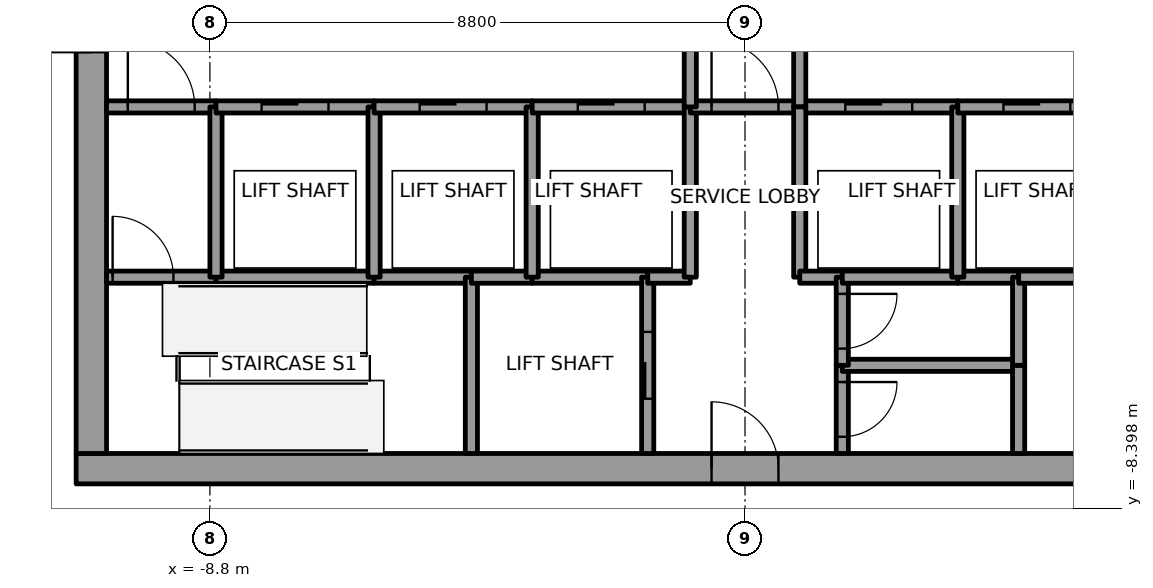
"""IFC4 building model, lengths in metres.
Left out: names, types, materials, properties, quantities, classifications, styles, units other than length and angle.
Written with IfcOpenShell. Run it as: python <this file> out.ifc"""

import sys

from ifc_helpers import new_model, si_unit, direction, frame, frame_2d, origin, place, context, subcontext, project, spatial, rectangle, extrude, element, fill, save


model = new_model("IFC4")
c1 = context("Model", 3, precision=1e-05, world=origin(), true_north=direction((0.0, 1.0)))
c2 = subcontext(c1, "Body", "Model", "MODEL_VIEW")
j1 = project(units=[si_unit("LENGTHUNIT", "METRE"), si_unit("PLANEANGLEUNIT", "RADIAN")], contexts=[c1])
p1 = place(None, origin())
s1 = spatial("IfcSite", under=j1, at=p1, CompositionType="ELEMENT")
p2 = place(p1, origin())
s2 = spatial("IfcBuilding", under=s1, at=p2, CompositionType="ELEMENT")
p3 = place(p2, frame((0.0, 0.0, 287.0)))
s3 = spatial("IfcBuildingStorey", under=s2, at=p3, CompositionType="ELEMENT", Elevation=287.0)
p4 = place(p3, frame((-11.0, -7.75, 0.0), z_axis=(0.0, 0.0, 1.0), x_axis=(1.0, 0.0, 0.0)))
e1 = element("IfcWall", 1, at=p4, inside=s3, PredefinedType="SHEAR", context=c2, shape_type="SweptSolid", body=[
    extrude(rectangle(XDim=22.0, YDim=0.5, at=frame_2d((11.0, 0.0))), origin(), (0.0, 0.0, 1.0), 4.0),
])
p5 = place(p4, frame((10.45, 0.0, 0.0)))
e2 = element("IfcOpeningElement", 2, at=p5, cuts=e1, PredefinedType="OPENING", context=c2, shape_type="SweptSolid", body=[
    extrude(rectangle(XDim=1.1, YDim=2.1, at=frame_2d((0.55, 1.05))), frame((0.0, 0.25, 0.0), z_axis=(0.0, -1.0, 0.0), x_axis=(1.0, 0.0, 0.0)), (0.0, 0.0, 1.0), 0.5),
])
p6 = place(p3, frame((-10.75, -7.5, 0.0), z_axis=(0.0, 0.0, 1.0), x_axis=(0.0, 1.0, 0.0)))
e3 = element("IfcWall", 3, at=p6, inside=s3, PredefinedType="SHEAR", context=c2, shape_type="SweptSolid", body=[
    extrude(rectangle(XDim=15.0, YDim=0.5, at=frame_2d((7.5, 0.0))), origin(), (0.0, 0.0, 1.0), 4.0),
])
p7 = place(p6, frame((6.6, 0.0, 0.0)))
e4 = element("IfcOpeningElement", 4, at=p7, cuts=e3, PredefinedType="OPENING", context=c2, shape_type="SweptSolid", body=[
    extrude(rectangle(XDim=1.8, YDim=2.1, at=frame_2d((0.9, 1.05))), frame((0.0, 0.25, 0.0), z_axis=(0.0, -1.0, 0.0), x_axis=(1.0, 0.0, 0.0)), (0.0, 0.0, 1.0), 0.5),
])
p8 = place(p3, frame((-10.5, -4.6, 0.0), z_axis=(0.0, 0.0, 1.0), x_axis=(1.0, 0.0, 0.0)))
e5 = element("IfcWall", 5, at=p8, inside=s3, PredefinedType="SOLIDWALL", context=c2, shape_type="SweptSolid", body=[
    extrude(rectangle(XDim=1.8, YDim=0.2, at=frame_2d((0.9, 0.0))), origin(), (0.0, 0.0, 1.0), 3.85),
])
p9 = place(p8, frame((0.1, 0.0, 0.0)))
e6 = element("IfcOpeningElement", 6, at=p9, cuts=e5, PredefinedType="OPENING", context=c2, shape_type="SweptSolid", body=[
    extrude(rectangle(XDim=1.0, YDim=2.1, at=frame_2d((0.5, 1.05))), frame((0.0, 0.1, 0.0), z_axis=(0.0, -1.0, 0.0), x_axis=(1.0, 0.0, 0.0)), (0.0, 0.0, 1.0), 0.2),
])
p10 = place(p3, frame((-10.5, -1.8, 0.0), z_axis=(0.0, 0.0, 1.0), x_axis=(1.0, 0.0, 0.0)))
e7 = element("IfcWall", 7, at=p10, inside=s3, PredefinedType="SOLIDWALL", context=c2, shape_type="SweptSolid", body=[
    extrude(rectangle(XDim=1.8, YDim=0.2, at=frame_2d((0.9, 0.0))), origin(), (0.0, 0.0, 1.0), 3.85),
])
p11 = place(p10, frame((0.35, 0.0, 0.0)))
e8 = element("IfcOpeningElement", 8, at=p11, cuts=e7, PredefinedType="OPENING", context=c2, shape_type="SweptSolid", body=[
    extrude(rectangle(XDim=1.1, YDim=2.1, at=frame_2d((0.55, 1.05))), frame((0.0, 0.1, 0.0), z_axis=(0.0, -1.0, 0.0), x_axis=(1.0, 0.0, 0.0)), (0.0, 0.0, 1.0), 0.2),
])
p12 = place(p3, frame((-8.7, -4.6, 0.0), z_axis=(0.0, 0.0, 1.0), x_axis=(1.0, 0.0, 0.0)))
e9 = element("IfcWall", 9, at=p12, inside=s3, PredefinedType="SOLIDWALL", context=c2, shape_type="SweptSolid", body=[
    extrude(rectangle(XDim=2.6, YDim=0.2, at=frame_2d((1.3, 0.0))), origin(), (0.0, 0.0, 1.0), 3.85),
])
p13 = place(p3, frame((-8.7, -4.6, 0.0), z_axis=(0.0, 0.0, 1.0), x_axis=(0.0, 1.0, 0.0)))
e10 = element("IfcWall", 10, at=p13, inside=s3, PredefinedType="SOLIDWALL", context=c2, shape_type="SweptSolid", body=[
    extrude(rectangle(XDim=2.8, YDim=0.2, at=frame_2d((1.4, 0.0))), origin(), (0.0, 0.0, 1.0), 3.85),
])
p14 = place(p3, frame((-8.7, -1.8, 0.0), z_axis=(0.0, 0.0, 1.0), x_axis=(1.0, 0.0, 0.0)))
e11 = element("IfcWall", 11, at=p14, inside=s3, PredefinedType="SOLIDWALL", context=c2, shape_type="SweptSolid", body=[
    extrude(rectangle(XDim=2.6, YDim=0.2, at=frame_2d((1.3, 0.0))), origin(), (0.0, 0.0, 1.0), 3.85),
])
p15 = place(p14, frame((0.75, 0.0, 0.0)))
e12 = element("IfcOpeningElement", 12, at=p15, cuts=e11, PredefinedType="OPENING", context=c2, shape_type="SweptSolid", body=[
    extrude(rectangle(XDim=1.1, YDim=2.1, at=frame_2d((0.55, 1.05))), frame((0.0, 0.1, 0.0), z_axis=(0.0, -1.0, 0.0), x_axis=(1.0, 0.0, 0.0)), (0.0, 0.0, 1.0), 0.2),
])
p16 = place(p3, frame((-6.1, -4.6, 0.0), z_axis=(0.0, 0.0, 1.0), x_axis=(1.0, 0.0, 0.0)))
e13 = element("IfcWall", 13, at=p16, inside=s3, PredefinedType="SOLIDWALL", context=c2, shape_type="SweptSolid", body=[
    extrude(rectangle(XDim=1.6, YDim=0.2, at=frame_2d((0.8, 0.0))), origin(), (0.0, 0.0, 1.0), 3.85),
])
p17 = place(p3, frame((-6.1, -4.6, 0.0), z_axis=(0.0, 0.0, 1.0), x_axis=(0.0, 1.0, 0.0)))
e14 = element("IfcWall", 14, at=p17, inside=s3, PredefinedType="SOLIDWALL", context=c2, shape_type="SweptSolid", body=[
    extrude(rectangle(XDim=2.8, YDim=0.2, at=frame_2d((1.4, 0.0))), origin(), (0.0, 0.0, 1.0), 3.85),
])
p18 = place(p3, frame((-6.1, -1.8, 0.0), z_axis=(0.0, 0.0, 1.0), x_axis=(1.0, 0.0, 0.0)))
e15 = element("IfcWall", 15, at=p18, inside=s3, PredefinedType="SOLIDWALL", context=c2, shape_type="SweptSolid", body=[
    extrude(rectangle(XDim=2.6, YDim=0.2, at=frame_2d((1.3, 0.0))), origin(), (0.0, 0.0, 1.0), 3.85),
])
p19 = place(p18, frame((0.75, 0.0, 0.0)))
e16 = element("IfcOpeningElement", 16, at=p19, cuts=e15, PredefinedType="OPENING", context=c2, shape_type="SweptSolid", body=[
    extrude(rectangle(XDim=1.1, YDim=2.1, at=frame_2d((0.55, 1.05))), frame((0.0, 0.1, 0.0), z_axis=(0.0, -1.0, 0.0), x_axis=(1.0, 0.0, 0.0)), (0.0, 0.0, 1.0), 0.2),
])
p20 = place(p3, frame((-4.5, -4.6, 0.0), z_axis=(0.0, 0.0, 1.0), x_axis=(0.0, -1.0, 0.0)))
e17 = element("IfcWall", 17, at=p20, inside=s3, PredefinedType="SOLIDWALL", context=c2, shape_type="SweptSolid", body=[
    extrude(rectangle(XDim=2.9, YDim=0.2, at=frame_2d((1.45, 0.0))), origin(), (0.0, 0.0, 1.0), 3.85),
])
p21 = place(p3, frame((-4.5, -4.6, 0.0), z_axis=(0.0, 0.0, 1.0), x_axis=(1.0, 0.0, 0.0)))
e18 = element("IfcWall", 18, at=p21, inside=s3, PredefinedType="SOLIDWALL", context=c2, shape_type="SweptSolid", body=[
    extrude(rectangle(XDim=1.0, YDim=0.2, at=frame_2d((0.5, 0.0))), origin(), (0.0, 0.0, 1.0), 3.85),
])
p22 = place(p3, frame((-3.5, -4.6, 0.0), z_axis=(0.0, 0.0, 1.0), x_axis=(1.0, 0.0, 0.0)))
e19 = element("IfcWall", 19, at=p22, inside=s3, PredefinedType="SOLIDWALL", context=c2, shape_type="SweptSolid", body=[
    extrude(rectangle(XDim=1.9, YDim=0.2, at=frame_2d((0.95, 0.0))), origin(), (0.0, 0.0, 1.0), 3.85),
])
p23 = place(p3, frame((-3.5, -4.6, 0.0), z_axis=(0.0, 0.0, 1.0), x_axis=(0.0, 1.0, 0.0)))
e20 = element("IfcWall", 20, at=p23, inside=s3, PredefinedType="SOLIDWALL", context=c2, shape_type="SweptSolid", body=[
    extrude(rectangle(XDim=2.8, YDim=0.2, at=frame_2d((1.4, 0.0))), origin(), (0.0, 0.0, 1.0), 3.85),
])
p24 = place(p3, frame((-3.5, -1.8, 0.0), z_axis=(0.0, 0.0, 1.0), x_axis=(1.0, 0.0, 0.0)))
e21 = element("IfcWall", 21, at=p24, inside=s3, PredefinedType="SOLIDWALL", context=c2, shape_type="SweptSolid", body=[
    extrude(rectangle(XDim=2.6, YDim=0.2, at=frame_2d((1.3, 0.0))), origin(), (0.0, 0.0, 1.0), 3.85),
])
p25 = place(p24, frame((0.75, 0.0, 0.0)))
e22 = element("IfcOpeningElement", 22, at=p25, cuts=e21, PredefinedType="OPENING", context=c2, shape_type="SweptSolid", body=[
    extrude(rectangle(XDim=1.1, YDim=2.1, at=frame_2d((0.55, 1.05))), frame((0.0, 0.1, 0.0), z_axis=(0.0, -1.0, 0.0), x_axis=(1.0, 0.0, 0.0)), (0.0, 0.0, 1.0), 0.2),
])
p26 = place(p3, frame((-1.6, -7.5, 0.0), z_axis=(0.0, 0.0, 1.0), x_axis=(0.0, 1.0, 0.0)))
e23 = element("IfcWall", 23, at=p26, inside=s3, PredefinedType="SOLIDWALL", context=c2, shape_type="SweptSolid", body=[
    extrude(rectangle(XDim=2.9, YDim=0.2, at=frame_2d((1.45, 0.0))), origin(), (0.0, 0.0, 1.0), 3.85),
])
p27 = place(p26, frame((0.9, 0.0, 0.0)))
e24 = element("IfcOpeningElement", 24, at=p27, cuts=e23, PredefinedType="OPENING", context=c2, shape_type="SweptSolid", body=[
    extrude(rectangle(XDim=1.1, YDim=2.1, at=frame_2d((0.55, 1.05))), frame((0.0, 0.1, 0.0), z_axis=(0.0, -1.0, 0.0), x_axis=(1.0, 0.0, 0.0)), (0.0, 0.0, 1.0), 0.2),
])
p28 = place(p3, frame((-1.6, -4.6, 0.0), z_axis=(0.0, 0.0, 1.0), x_axis=(1.0, 0.0, 0.0)))
e25 = element("IfcWall", 25, at=p28, inside=s3, PredefinedType="SOLIDWALL", context=c2, shape_type="SweptSolid", body=[
    extrude(rectangle(XDim=0.7, YDim=0.2, at=frame_2d((0.35, 0.0))), origin(), (0.0, 0.0, 1.0), 3.85),
])
p29 = place(p3, frame((-0.9, -4.6, 0.0), z_axis=(0.0, 0.0, 1.0), x_axis=(0.0, 1.0, 0.0)))
e26 = element("IfcWall", 26, at=p29, inside=s3, PredefinedType="SOLIDWALL", context=c2, shape_type="SweptSolid", body=[
    extrude(rectangle(XDim=2.8, YDim=0.2, at=frame_2d((1.4, 0.0))), origin(), (0.0, 0.0, 1.0), 3.85),
])
p30 = place(p3, frame((-0.9, -1.8, 0.0), z_axis=(0.0, 0.0, 1.0), x_axis=(1.0, 0.0, 0.0)))
e27 = element("IfcWall", 27, at=p30, inside=s3, PredefinedType="SOLIDWALL", context=c2, shape_type="SweptSolid", body=[
    extrude(rectangle(XDim=1.8, YDim=0.2, at=frame_2d((0.9, 0.0))), origin(), (0.0, 0.0, 1.0), 3.85),
])
p31 = place(p30, frame((0.35, 0.0, 0.0)))
e28 = element("IfcOpeningElement", 28, at=p31, cuts=e27, PredefinedType="OPENING", context=c2, shape_type="SweptSolid", body=[
    extrude(rectangle(XDim=1.1, YDim=2.1, at=frame_2d((0.55, 1.05))), frame((0.0, 0.1, 0.0), z_axis=(0.0, -1.0, 0.0), x_axis=(1.0, 0.0, 0.0)), (0.0, 0.0, 1.0), 0.2),
])
p32 = place(p3, frame((-0.9, 1.8, 0.0), z_axis=(0.0, 0.0, 1.0), x_axis=(0.0, -1.0, 0.0)))
e29 = element("IfcWall", 29, at=p32, inside=s3, PredefinedType="SOLIDWALL", context=c2, shape_type="SweptSolid", body=[
    extrude(rectangle(XDim=3.6, YDim=0.2, at=frame_2d((1.8, 0.0))), origin(), (0.0, 0.0, 1.0), 3.85),
])
p33 = place(p32, frame((1.05, 0.0, 0.0)))
e30 = element("IfcOpeningElement", 30, at=p33, cuts=e29, PredefinedType="OPENING", context=c2, shape_type="SweptSolid", body=[
    extrude(rectangle(XDim=1.5, YDim=2.1, at=frame_2d((0.75, 1.05))), frame((0.0, 0.1, 0.0), z_axis=(0.0, -1.0, 0.0), x_axis=(1.0, 0.0, 0.0)), (0.0, 0.0, 1.0), 0.2),
])
p34 = place(p3, frame((0.9, -1.8, 0.0), z_axis=(0.0, 0.0, 1.0), x_axis=(1.0, 0.0, 0.0)))
e31 = element("IfcWall", 31, at=p34, inside=s3, PredefinedType="SOLIDWALL", context=c2, shape_type="SweptSolid", body=[
    extrude(rectangle(XDim=2.6, YDim=0.2, at=frame_2d((1.3, 0.0))), origin(), (0.0, 0.0, 1.0), 3.85),
])
p35 = place(p34, frame((0.75, 0.0, 0.0)))
e32 = element("IfcOpeningElement", 32, at=p35, cuts=e31, PredefinedType="OPENING", context=c2, shape_type="SweptSolid", body=[
    extrude(rectangle(XDim=1.1, YDim=2.1, at=frame_2d((0.55, 1.05))), frame((0.0, 0.1, 0.0), z_axis=(0.0, -1.0, 0.0), x_axis=(1.0, 0.0, 0.0)), (0.0, 0.0, 1.0), 0.2),
])
p36 = place(p3, frame((0.9, -1.8, 0.0), z_axis=(0.0, 0.0, 1.0), x_axis=(0.0, 1.0, 0.0)))
e33 = element("IfcWall", 33, at=p36, inside=s3, PredefinedType="SOLIDWALL", context=c2, shape_type="SweptSolid", body=[
    extrude(rectangle(XDim=3.6, YDim=0.2, at=frame_2d((1.8, 0.0))), origin(), (0.0, 0.0, 1.0), 3.85),
])
p37 = place(p36, frame((1.05, 0.0, 0.0)))
e34 = element("IfcOpeningElement", 34, at=p37, cuts=e33, PredefinedType="OPENING", context=c2, shape_type="SweptSolid", body=[
    extrude(rectangle(XDim=1.5, YDim=2.1, at=frame_2d((0.75, 1.05))), frame((0.0, 0.1, 0.0), z_axis=(0.0, -1.0, 0.0), x_axis=(1.0, 0.0, 0.0)), (0.0, 0.0, 1.0), 0.2),
])
p38 = place(p3, frame((0.9, -1.8, 0.0), z_axis=(0.0, 0.0, 1.0), x_axis=(0.0, -1.0, 0.0)))
e35 = element("IfcWall", 35, at=p38, inside=s3, PredefinedType="SOLIDWALL", context=c2, shape_type="SweptSolid", body=[
    extrude(rectangle(XDim=2.8, YDim=0.2, at=frame_2d((1.4, 0.0))), origin(), (0.0, 0.0, 1.0), 3.85),
])
p39 = place(p3, frame((0.9, -4.6, 0.0), z_axis=(0.0, 0.0, 1.0), x_axis=(1.0, 0.0, 0.0)))
e36 = element("IfcWall", 36, at=p39, inside=s3, PredefinedType="SOLIDWALL", context=c2, shape_type="SweptSolid", body=[
    extrude(rectangle(XDim=0.7, YDim=0.2, at=frame_2d((0.35, 0.0))), origin(), (0.0, 0.0, 1.0), 3.85),
])
p40 = place(p3, frame((1.6, -6.05, 0.0), z_axis=(0.0, 0.0, 1.0), x_axis=(0.0, -1.0, 0.0)))
e37 = element("IfcWall", 37, at=p40, inside=s3, PredefinedType="SOLIDWALL", context=c2, shape_type="SweptSolid", body=[
    extrude(rectangle(XDim=1.45, YDim=0.2, at=frame_2d((0.725, 0.0))), origin(), (0.0, 0.0, 1.0), 3.85),
])
p41 = place(p40, frame((0.275, 0.0, 0.0)))
e38 = element("IfcOpeningElement", 38, at=p41, cuts=e37, PredefinedType="OPENING", context=c2, shape_type="SweptSolid", body=[
    extrude(rectangle(XDim=0.9, YDim=2.1, at=frame_2d((0.45, 1.05))), frame((0.0, 0.1, 0.0), z_axis=(0.0, -1.0, 0.0), x_axis=(1.0, 0.0, 0.0)), (0.0, 0.0, 1.0), 0.2),
])
p42 = place(p3, frame((4.5, -6.05, 0.0), z_axis=(0.0, 0.0, 1.0), x_axis=(-1.0, 0.0, 0.0)))
e39 = element("IfcWall", 39, at=p42, inside=s3, PredefinedType="SOLIDWALL", context=c2, shape_type="SweptSolid", body=[
    extrude(rectangle(XDim=2.9, YDim=0.2, at=frame_2d((1.45, 0.0))), origin(), (0.0, 0.0, 1.0), 3.85),
])
p43 = place(p3, frame((1.6, -4.6, 0.0), z_axis=(0.0, 0.0, 1.0), x_axis=(0.0, -1.0, 0.0)))
e40 = element("IfcWall", 40, at=p43, inside=s3, PredefinedType="SOLIDWALL", context=c2, shape_type="SweptSolid", body=[
    extrude(rectangle(XDim=1.45, YDim=0.2, at=frame_2d((0.725, 0.0))), origin(), (0.0, 0.0, 1.0), 3.85),
])
p44 = place(p43, frame((0.275, 0.0, 0.0)))
e41 = element("IfcOpeningElement", 41, at=p44, cuts=e40, PredefinedType="OPENING", context=c2, shape_type="SweptSolid", body=[
    extrude(rectangle(XDim=0.9, YDim=2.1, at=frame_2d((0.45, 1.05))), frame((0.0, 0.1, 0.0), z_axis=(0.0, -1.0, 0.0), x_axis=(1.0, 0.0, 0.0)), (0.0, 0.0, 1.0), 0.2),
])
p45 = place(p3, frame((3.5, -4.6, 0.0), z_axis=(0.0, 0.0, 1.0), x_axis=(-1.0, 0.0, 0.0)))
e42 = element("IfcWall", 42, at=p45, inside=s3, PredefinedType="SOLIDWALL", context=c2, shape_type="SweptSolid", body=[
    extrude(rectangle(XDim=1.9, YDim=0.2, at=frame_2d((0.95, 0.0))), origin(), (0.0, 0.0, 1.0), 3.85),
])
p46 = place(p3, frame((4.5, -4.6, 0.0), z_axis=(0.0, 0.0, 1.0), x_axis=(-1.0, 0.0, 0.0)))
e43 = element("IfcWall", 43, at=p46, inside=s3, PredefinedType="SOLIDWALL", context=c2, shape_type="SweptSolid", body=[
    extrude(rectangle(XDim=1.0, YDim=0.2, at=frame_2d((0.5, 0.0))), origin(), (0.0, 0.0, 1.0), 3.85),
])
p47 = place(p3, frame((3.5, -4.6, 0.0), z_axis=(0.0, 0.0, 1.0), x_axis=(0.0, 1.0, 0.0)))
e44 = element("IfcWall", 44, at=p47, inside=s3, PredefinedType="SOLIDWALL", context=c2, shape_type="SweptSolid", body=[
    extrude(rectangle(XDim=2.8, YDim=0.2, at=frame_2d((1.4, 0.0))), origin(), (0.0, 0.0, 1.0), 3.85),
])
p48 = place(p3, frame((3.5, -1.8, 0.0), z_axis=(0.0, 0.0, 1.0), x_axis=(1.0, 0.0, 0.0)))
e45 = element("IfcWall", 45, at=p48, inside=s3, PredefinedType="SOLIDWALL", context=c2, shape_type="SweptSolid", body=[
    extrude(rectangle(XDim=2.6, YDim=0.2, at=frame_2d((1.3, 0.0))), origin(), (0.0, 0.0, 1.0), 3.85),
])
p49 = place(p48, frame((0.75, 0.0, 0.0)))
e46 = element("IfcOpeningElement", 46, at=p49, cuts=e45, PredefinedType="OPENING", context=c2, shape_type="SweptSolid", body=[
    extrude(rectangle(XDim=1.1, YDim=2.1, at=frame_2d((0.55, 1.05))), frame((0.0, 0.1, 0.0), z_axis=(0.0, -1.0, 0.0), x_axis=(1.0, 0.0, 0.0)), (0.0, 0.0, 1.0), 0.2),
])
for number, where, z_axis, x_axis in (
    (47, (4.5, -6.05, 0.0), (0.0, 0.0, 1.0), (0.0, -1.0, 0.0)),
    (48, (4.5, -4.6, 0.0), (0.0, 0.0, 1.0), (0.0, -1.0, 0.0)),
):
    element("IfcWall", number, at=place(p3, frame(where, z_axis=z_axis, x_axis=x_axis)), inside=s3, PredefinedType="SOLIDWALL", context=c2, shape_type="SweptSolid", body=[
        extrude(rectangle(XDim=1.45, YDim=0.2, at=frame_2d((0.725, 0.0))), origin(), (0.0, 0.0, 1.0), 3.85),
    ])
p50 = place(p3, frame((6.1, -4.6, 0.0), z_axis=(0.0, 0.0, 1.0), x_axis=(-1.0, 0.0, 0.0)))
e49 = element("IfcWall", 49, at=p50, inside=s3, PredefinedType="SOLIDWALL", context=c2, shape_type="SweptSolid", body=[
    extrude(rectangle(XDim=1.6, YDim=0.2, at=frame_2d((0.8, 0.0))), origin(), (0.0, 0.0, 1.0), 3.85),
])
p51 = place(p15, origin())
e50 = element("IfcDoor", 50, at=p51, inside=s3, OperationType="SLIDING_TO_LEFT", PredefinedType="DOOR", context=c2, shape_type="SweptSolid", body=[
    extrude(rectangle(XDim=1.1, YDim=2.1, at=frame_2d((0.55, 1.05))), frame((0.0, 0.025, 0.0), z_axis=(0.0, -1.0, 0.0), x_axis=(1.0, 0.0, 0.0)), (0.0, 0.0, 1.0), 0.05),
])
fill(e12, e50)
p52 = place(p19, origin())
e51 = element("IfcDoor", 51, at=p52, inside=s3, OperationType="SLIDING_TO_LEFT", PredefinedType="DOOR", context=c2, shape_type="SweptSolid", body=[
    extrude(rectangle(XDim=1.1, YDim=2.1, at=frame_2d((0.55, 1.05))), frame((0.0, 0.025, 0.0), z_axis=(0.0, -1.0, 0.0), x_axis=(1.0, 0.0, 0.0)), (0.0, 0.0, 1.0), 0.05),
])
fill(e16, e51)
p53 = place(p25, origin())
e52 = element("IfcDoor", 52, at=p53, inside=s3, OperationType="SLIDING_TO_LEFT", PredefinedType="DOOR", context=c2, shape_type="SweptSolid", body=[
    extrude(rectangle(XDim=1.1, YDim=2.1, at=frame_2d((0.55, 1.05))), frame((0.0, 0.025, 0.0), z_axis=(0.0, -1.0, 0.0), x_axis=(1.0, 0.0, 0.0)), (0.0, 0.0, 1.0), 0.05),
])
fill(e22, e52)
p54 = place(p35, origin())
e53 = element("IfcDoor", 53, at=p54, inside=s3, OperationType="SLIDING_TO_RIGHT", PredefinedType="DOOR", context=c2, shape_type="SweptSolid", body=[
    extrude(rectangle(XDim=1.1, YDim=2.1, at=frame_2d((0.55, 1.05))), frame((0.0, 0.025, 0.0), z_axis=(0.0, -1.0, 0.0), x_axis=(1.0, 0.0, 0.0)), (0.0, 0.0, 1.0), 0.05),
])
fill(e32, e53)
p55 = place(p49, origin())
e54 = element("IfcDoor", 54, at=p55, inside=s3, OperationType="SLIDING_TO_RIGHT", PredefinedType="DOOR", context=c2, shape_type="SweptSolid", body=[
    extrude(rectangle(XDim=1.1, YDim=2.1, at=frame_2d((0.55, 1.05))), frame((0.0, 0.025, 0.0), z_axis=(0.0, -1.0, 0.0), x_axis=(1.0, 0.0, 0.0)), (0.0, 0.0, 1.0), 0.05),
])
fill(e46, e54)
p56 = place(p27, origin())
e55 = element("IfcDoor", 55, at=p56, inside=s3, OperationType="SLIDING_TO_RIGHT", PredefinedType="DOOR", context=c2, shape_type="SweptSolid", body=[
    extrude(rectangle(XDim=1.1, YDim=2.1, at=frame_2d((0.55, 1.05))), frame((0.0, 0.025, 0.0), z_axis=(0.0, -1.0, 0.0), x_axis=(1.0, 0.0, 0.0)), (0.0, 0.0, 1.0), 0.05),
])
fill(e24, e55)
p57 = place(p11, origin())
e56 = element("IfcDoor", 56, at=p57, inside=s3, OperationType="SINGLE_SWING_RIGHT", PredefinedType="DOOR", context=c2, shape_type="SweptSolid", body=[
    extrude(rectangle(XDim=1.1, YDim=2.1, at=frame_2d((0.55, 1.05))), frame((0.0, 0.025, 0.0), z_axis=(0.0, -1.0, 0.0), x_axis=(1.0, 0.0, 0.0)), (0.0, 0.0, 1.0), 0.05),
])
fill(e8, e56)
p58 = place(p31, origin())
e57 = element("IfcDoor", 57, at=p58, inside=s3, OperationType="SINGLE_SWING_RIGHT", PredefinedType="DOOR", context=c2, shape_type="SweptSolid", body=[
    extrude(rectangle(XDim=1.1, YDim=2.1, at=frame_2d((0.55, 1.05))), frame((0.0, 0.025, 0.0), z_axis=(0.0, -1.0, 0.0), x_axis=(1.0, 0.0, 0.0)), (0.0, 0.0, 1.0), 0.05),
])
fill(e28, e57)
p59 = place(p9, origin())
e58 = element("IfcDoor", 58, at=p59, inside=s3, OperationType="SINGLE_SWING_LEFT", PredefinedType="DOOR", context=c2, shape_type="SweptSolid", body=[
    extrude(rectangle(XDim=1.0, YDim=2.1, at=frame_2d((0.5, 1.05))), frame((0.0, 0.025, 0.0), z_axis=(0.0, -1.0, 0.0), x_axis=(1.0, 0.0, 0.0)), (0.0, 0.0, 1.0), 0.05),
])
fill(e6, e58)
p60 = place(p41, origin())
e59 = element("IfcDoor", 59, at=p60, inside=s3, OperationType="SINGLE_SWING_LEFT", PredefinedType="DOOR", context=c2, shape_type="SweptSolid", body=[
    extrude(rectangle(XDim=0.9, YDim=2.1, at=frame_2d((0.45, 1.05))), frame((0.0, 0.025, 0.0), z_axis=(0.0, -1.0, 0.0), x_axis=(1.0, 0.0, 0.0)), (0.0, 0.0, 1.0), 0.05),
])
fill(e38, e59)
p61 = place(p44, origin())
e60 = element("IfcDoor", 60, at=p61, inside=s3, OperationType="SINGLE_SWING_LEFT", PredefinedType="DOOR", context=c2, shape_type="SweptSolid", body=[
    extrude(rectangle(XDim=0.9, YDim=2.1, at=frame_2d((0.45, 1.05))), frame((0.0, 0.025, 0.0), z_axis=(0.0, -1.0, 0.0), x_axis=(1.0, 0.0, 0.0)), (0.0, 0.0, 1.0), 0.05),
])
fill(e41, e60)
p62 = place(p7, origin())
e61 = element("IfcDoor", 61, at=p62, inside=s3, OperationType="DOUBLE_DOOR_SINGLE_SWING", PredefinedType="DOOR", context=c2, shape_type="SweptSolid", body=[
    extrude(rectangle(XDim=1.8, YDim=2.1, at=frame_2d((0.9, 1.05))), frame((0.0, 0.025, 0.0), z_axis=(0.0, -1.0, 0.0), x_axis=(1.0, 0.0, 0.0)), (0.0, 0.0, 1.0), 0.05),
])
fill(e4, e61)
p63 = place(p5, origin())
e62 = element("IfcDoor", 62, at=p63, inside=s3, OperationType="SINGLE_SWING_LEFT", PredefinedType="DOOR", context=c2, shape_type="SweptSolid", body=[
    extrude(rectangle(XDim=1.1, YDim=2.1, at=frame_2d((0.55, 1.05))), frame((0.0, 0.025, 0.0), z_axis=(0.0, -1.0, 0.0), x_axis=(1.0, 0.0, 0.0)), (0.0, 0.0, 1.0), 0.05),
])
fill(e2, e62)
save(model, sys.argv[1])
